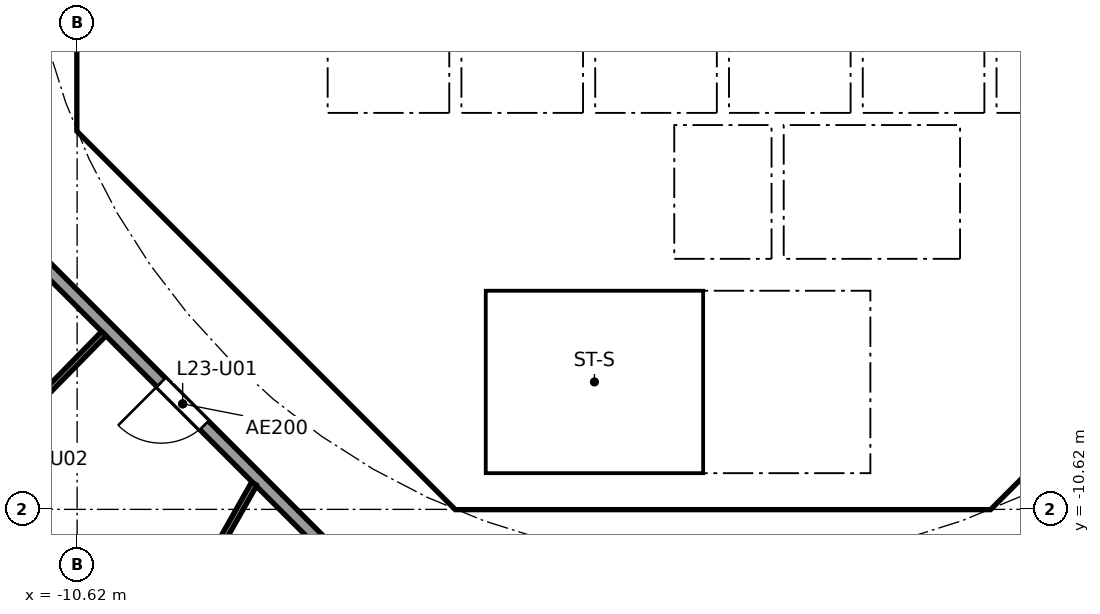
"""IFC4 building model, lengths in metres.
Left out: names, types, materials, properties, quantities, classifications, styles, units other than length and angle.
Written with IfcOpenShell. Run it as: python <this file> out.ifc"""

import sys

from ifc_helpers import new_model, si_unit, direction, frame, frame_2d, origin, place, context, subcontext, project, spatial, polyline, rectangle, outline, extrude, element, fill, save


model = new_model("IFC4")
c1 = context("Model", 3, precision=1e-05, world=origin(), true_north=direction((0.0, 1.0)))
c2 = subcontext(c1, "Body", "Model", "MODEL_VIEW")
j1 = project(units=[si_unit("LENGTHUNIT", "METRE"), si_unit("PLANEANGLEUNIT", "RADIAN")], contexts=[c1])
p1 = place(None, origin())
s1 = spatial("IfcSite", under=j1, at=p1, CompositionType="ELEMENT")
p2 = place(p1, origin())
s2 = spatial("IfcBuilding", under=s1, at=p2, CompositionType="ELEMENT")
p3 = place(p2, frame((0.0, 0.0, 95.5)))
s3 = spatial("IfcBuildingStorey", under=s2, at=p3, CompositionType="ELEMENT", Elevation=95.5)
p4 = place(p3, frame((-10.325, 3.801, 0.0), z_axis=(0.0, 0.0, 1.0), x_axis=(0.0, -1.0, 0.0)))
e1 = element("IfcWall", 1, at=p4, inside=s3, PredefinedType="SHEAR", context=c2, shape_type="SweptSolid", body=[
    extrude(rectangle(XDim=7.602, YDim=0.6, at=frame_2d((3.801, 0.0))), origin(), (0.0, 0.0, 1.0), 3.44),
])
p5 = place(p4, frame((0.651, 0.0, 0.0)))
e2 = element("IfcOpeningElement", 2, at=p5, cuts=e1, PredefinedType="OPENING", context=c2, shape_type="SweptSolid", body=[
    extrude(rectangle(XDim=1.5, YDim=2.1, at=frame_2d((0.75, 1.05))), frame((0.0, 0.31, 0.0), z_axis=(0.0, -1.0, 0.0), x_axis=(1.0, 0.0, 0.0)), (0.0, 0.0, 1.0), 0.62),
])
p6 = place(p4, frame((5.451, 0.0, 0.0)))
e3 = element("IfcOpeningElement", 3, at=p6, cuts=e1, PredefinedType="OPENING", context=c2, shape_type="SweptSolid", body=[
    extrude(rectangle(XDim=1.5, YDim=2.1, at=frame_2d((0.75, 1.05))), frame((0.0, 0.31, 0.0), z_axis=(0.0, -1.0, 0.0), x_axis=(1.0, 0.0, 0.0)), (0.0, 0.0, 1.0), 0.62),
])
p7 = place(p3, frame((-9.988, -4.613, 0.0), z_axis=(0.0, 0.0, 1.0), x_axis=(0.707106781187, -0.707106781187, 0.0)))
e4 = element("IfcWall", 4, at=p7, inside=s3, PredefinedType="SHEAR", context=c2, shape_type="SweptSolid", body=[
    extrude(rectangle(XDim=7.602, YDim=0.6, at=frame_2d((3.801, 0.0))), origin(), (0.0, 0.0, 1.0), 3.44),
])
p8 = place(p7, frame((6.151, 0.0, 0.0)))
e5 = element("IfcOpeningElement", 5, at=p8, cuts=e4, PredefinedType="OPENING", context=c2, shape_type="SweptSolid", body=[
    extrude(rectangle(XDim=1.1, YDim=2.1, at=frame_2d((0.55, 1.05))), frame((0.0, 0.31, 0.0), z_axis=(0.0, -1.0, 0.0), x_axis=(1.0, 0.0, 0.0)), (0.0, 0.0, 1.0), 0.62),
])
p9 = place(p3, frame((4.613, -9.988, 0.0), z_axis=(0.0, 0.0, 1.0), x_axis=(0.707106781187, 0.707106781187, 0.0)))
e6 = element("IfcWall", 6, at=p9, inside=s3, PredefinedType="SHEAR", context=c2, shape_type="SweptSolid", body=[
    extrude(rectangle(XDim=7.602, YDim=0.6, at=frame_2d((3.801, 0.0))), origin(), (0.0, 0.0, 1.0), 3.44),
])
p10 = place(p9, frame((3.201, 0.0, 0.0)))
e7 = element("IfcOpeningElement", 7, at=p10, cuts=e6, PredefinedType="OPENING", context=c2, shape_type="SweptSolid", body=[
    extrude(rectangle(XDim=1.2, YDim=2.1, at=frame_2d((0.6, 1.05))), frame((0.0, 0.31, 0.0), z_axis=(0.0, -1.0, 0.0), x_axis=(1.0, 0.0, 0.0)), (0.0, 0.0, 1.0), 0.62),
])
p11 = place(p3, frame((4.0, -10.025, 0.0), z_axis=(0.0, 0.0, 1.0), x_axis=(0.0, 1.0, 0.0)))
e8 = element("IfcWall", 8, at=p11, inside=s3, PredefinedType="SOLIDWALL", context=c2, shape_type="SweptSolid", body=[
    extrude(rectangle(XDim=3.0, YDim=0.2, at=frame_2d((1.5, 0.0))), origin(), (0.0, 0.0, 1.0), 3.44),
])
p12 = place(p11, frame((0.975, 0.0, 0.0)))
e9 = element("IfcOpeningElement", 9, at=p12, cuts=e8, PredefinedType="OPENING", context=c2, shape_type="SweptSolid", body=[
    extrude(rectangle(XDim=1.1, YDim=2.1, at=frame_2d((0.55, 1.05))), frame((0.0, 0.11, 0.0), z_axis=(0.0, -1.0, 0.0), x_axis=(1.0, 0.0, 0.0)), (0.0, 0.0, 1.0), 0.22),
])
p13 = place(p3, frame((-7.4, -6.627, 0.0), z_axis=(0.0, 0.0, 1.0), x_axis=(0.0, 1.0, 0.0)))
e10 = element("IfcWall", 10, at=p13, inside=s3, PredefinedType="PARTITIONING", context=c2, shape_type="SweptSolid", body=[
    extrude(rectangle(XDim=2.527, YDim=0.15, at=frame_2d((1.263, 0.0))), origin(), (0.0, 0.0, 1.0), 3.44),
])
p14 = place(p13, frame((0.776, 0.0, 0.0)))
e11 = element("IfcOpeningElement", 11, at=p14, cuts=e10, PredefinedType="OPENING", context=c2, shape_type="SweptSolid", body=[
    extrude(rectangle(XDim=0.9, YDim=2.1, at=frame_2d((0.45, 1.05))), frame((0.0, 0.085, 0.0), z_axis=(0.0, -1.0, 0.0), x_axis=(1.0, 0.0, 0.0)), (0.0, 0.0, 1.0), 0.17),
])
p15 = place(p3, frame((4.0, -6.5, 0.0), z_axis=(0.0, 0.0, 1.0), x_axis=(0.0, 1.0, 0.0)))
e12 = element("IfcWall", 12, at=p15, inside=s3, PredefinedType="SOLIDWALL", context=c2, shape_type="SweptSolid", body=[
    extrude(rectangle(XDim=2.2, YDim=0.2, at=frame_2d((1.1, 0.0))), origin(), (0.0, 0.0, 1.0), 3.44),
])
p16 = place(p15, frame((0.55, 0.0, 0.0)))
e13 = element("IfcOpeningElement", 13, at=p16, cuts=e12, PredefinedType="OPENING", context=c2, shape_type="SweptSolid", body=[
    extrude(rectangle(XDim=1.1, YDim=2.1, at=frame_2d((0.55, 1.05))), frame((0.0, 0.11, 0.0), z_axis=(0.0, -1.0, 0.0), x_axis=(1.0, 0.0, 0.0)), (0.0, 0.0, 1.0), 0.22),
])
p17 = place(p3, frame((-4.0, -6.5, 0.0), z_axis=(0.0, 0.0, 1.0), x_axis=(0.0, 1.0, 0.0)))
e14 = element("IfcWall", 14, at=p17, inside=s3, PredefinedType="SOLIDWALL", context=c2, shape_type="SweptSolid", body=[
    extrude(rectangle(XDim=2.2, YDim=0.2, at=frame_2d((1.1, 0.0))), origin(), (0.0, 0.0, 1.0), 3.44),
])
p18 = place(p17, frame((0.65, 0.0, 0.0)))
e15 = element("IfcOpeningElement", 15, at=p18, cuts=e14, PredefinedType="OPENING", context=c2, shape_type="SweptSolid", body=[
    extrude(rectangle(XDim=0.9, YDim=2.1, at=frame_2d((0.45, 1.05))), frame((0.0, 0.11, 0.0), z_axis=(0.0, -1.0, 0.0), x_axis=(1.0, 0.0, 0.0)), (0.0, 0.0, 1.0), 0.22),
])
p19 = place(p3, origin())
e16 = element("IfcWall", 16, at=p19, inside=s3, PredefinedType="SHEAR", context=c2, shape_type="SweptSolid", body=[
    extrude(outline(polyline([(-10.625, -3.801), (-10.025, -3.801), (-10.025, -4.152), (-9.776, -4.401), (-10.2, -4.825), (-10.625, -4.401), (-10.625, -3.801)])), origin(), (0.0, 0.0, 1.0), 3.44),
])
p20 = place(p3, origin())
e17 = element("IfcWall", 17, at=p20, inside=s3, PredefinedType="SHEAR", context=c2, shape_type="SweptSolid", body=[
    extrude(outline(polyline([(-4.152, -10.025), (4.152, -10.025), (4.401, -9.776), (4.825, -10.2), (4.401, -10.625), (-4.401, -10.625), (-4.825, -10.2), (-4.401, -9.776), (-4.152, -10.025)])), origin(), (0.0, 0.0, 1.0), 3.44),
])
for number, where, z_axis, x_axis in (
    (18, (-0.9, -6.5, 0.0), (0.0, 0.0, 1.0), (0.0, 1.0, 0.0)),
    (19, (0.9, -6.5, 0.0), (0.0, 0.0, 1.0), (0.0, 1.0, 0.0)),
):
    element("IfcWall", number, at=place(p3, frame(where, z_axis=z_axis, x_axis=x_axis)), inside=s3, PredefinedType="SOLIDWALL", context=c2, shape_type="SweptSolid", body=[
        extrude(rectangle(XDim=2.2, YDim=0.2, at=frame_2d((1.1, 0.0))), origin(), (0.0, 0.0, 1.0), 3.44),
    ])
p21 = place(p3, origin())
e20 = element("IfcWall", 20, at=p21, inside=s3, PredefinedType="SOLIDWALL", context=c2, shape_type="SweptSolid", body=[
    extrude(outline(polyline([(-6.7, -2.1), (-6.5, -2.1), (-6.5, -4.1), (-4.5, -4.1), (-4.5, -2.1), (-4.3, -2.1), (-4.3, -4.1), (-2.3, -4.1), (-2.3, -2.1), (-2.1, -2.1), (-2.1, -4.1), (-0.1, -4.1), (-0.1, -2.1), (0.1, -2.1), (0.1, -4.1), (2.1, -4.1), (2.1, -2.1), (2.3, -2.1), (2.3, -4.1), (4.3, -4.1), (4.3, -2.1), (4.5, -2.1), (4.5, -4.1), (6.5, -4.1), (6.5, -2.1), (6.7, -2.1), (6.7, -4.3), (-6.7, -4.3), (-6.7, -2.1)])), origin(), (0.0, 0.0, 1.0), 3.44),
])
p22 = place(p3, frame((-10.025, -4.0, 0.0), z_axis=(0.0, 0.0, 1.0), x_axis=(1.0, 0.0, 0.0)))
e21 = element("IfcWall", 21, at=p22, inside=s3, PredefinedType="PARTITIONING", context=c2, shape_type="SweptSolid", body=[
    extrude(rectangle(XDim=3.325, YDim=0.2, at=frame_2d((1.662, 0.0))), origin(), (0.0, 0.0, 1.0), 3.44),
])
p23 = place(p3, origin())
e22 = element("IfcWall", 22, at=p23, inside=s3, PredefinedType="SOLIDWALL", context=c2, shape_type="SweptSolid", body=[
    extrude(outline(polyline([(-3.9, -10.025), (-4.1, -10.025), (-4.1, -7.025), (-3.9, -7.025), (-3.9, -10.025)])), origin(), (0.0, 0.0, 1.0), 3.44),
])
p24 = place(p3, origin())
e23 = element("IfcWall", 23, at=p24, inside=s3, PredefinedType="SOLIDWALL", context=c2, shape_type="SweptSolid", body=[
    extrude(outline(polyline([(4.1, -7.025), (-4.1, -7.025), (-4.1, -6.5), (4.1, -6.5), (4.1, -7.025)])), origin(), (0.0, 0.0, 1.0), 3.44),
])
p25 = place(p3, frame((-12.635, -5.134, 0.0), z_axis=(0.0, 0.0, 1.0), x_axis=(0.707106781187, -0.707106781187, 0.0)))
e24 = element("IfcWall", 24, at=p25, inside=s3, PredefinedType="PARTITIONING", context=c2, shape_type="SweptSolid", body=[
    extrude(rectangle(XDim=10.609, YDim=0.2, at=frame_2d((5.305, 0.0))), origin(), (0.0, 0.0, 1.0), 3.44),
])
p26 = place(p25, frame((4.804, 0.0, 0.0)))
e25 = element("IfcOpeningElement", 25, at=p26, cuts=e24, PredefinedType="OPENING", context=c2, shape_type="SweptSolid", body=[
    extrude(rectangle(XDim=1.0, YDim=2.1, at=frame_2d((0.5, 1.05))), frame((0.0, 0.11, 0.0), z_axis=(0.0, -1.0, 0.0), x_axis=(1.0, 0.0, 0.0)), (0.0, 0.0, 1.0), 0.22),
])
p27 = place(p3, frame((-10.181, -7.729, 0.0), z_axis=(0.0, 0.0, 1.0), x_axis=(-0.699710752188, -0.714426247609, 0.0)))
e26 = element("IfcWall", 26, at=p27, inside=s3, PredefinedType="PARTITIONING", context=c2, shape_type="SweptSolid", body=[
    extrude(rectangle(XDim=9.938, YDim=0.1, at=frame_2d((4.969, 0.0))), origin(), (0.0, 0.0, 1.0), 2.687),
])
p28 = place(p27, frame((1.675, 0.0, 0.0)))
e27 = element("IfcOpeningElement", 27, at=p28, cuts=e26, PredefinedType="OPENING", context=c2, shape_type="SweptSolid", body=[
    extrude(rectangle(XDim=0.9, YDim=2.1, at=frame_2d((0.45, 1.05))), frame((0.0, 0.06, 0.0), z_axis=(0.0, -1.0, 0.0), x_axis=(1.0, 0.0, 0.0)), (0.0, 0.0, 1.0), 0.12),
])
p29 = place(p27, frame((6.619, 0.0, 0.0)))
e28 = element("IfcOpeningElement", 28, at=p29, cuts=e26, PredefinedType="OPENING", context=c2, shape_type="SweptSolid", body=[
    extrude(rectangle(XDim=0.9, YDim=2.1, at=frame_2d((0.45, 1.05))), frame((0.0, 0.06, 0.0), z_axis=(0.0, -1.0, 0.0), x_axis=(1.0, 0.0, 0.0)), (0.0, 0.0, 1.0), 0.12),
])
p30 = place(p3, frame((-7.707, -10.198, 0.0), z_axis=(0.0, 0.0, 1.0), x_axis=(-0.49395524734, -0.869487328042, 0.0)))
e29 = element("IfcWall", 29, at=p30, inside=s3, PredefinedType="PARTITIONING", context=c2, shape_type="SweptSolid", body=[
    extrude(rectangle(XDim=15.025, YDim=0.1, at=frame_2d((7.512, 0.0))), origin(), (0.0, 0.0, 1.0), 2.687),
])
p31 = place(p30, frame((1.684, 0.0, 0.0)))
e30 = element("IfcOpeningElement", 30, at=p31, cuts=e29, PredefinedType="OPENING", context=c2, shape_type="SweptSolid", body=[
    extrude(rectangle(XDim=0.9, YDim=2.1, at=frame_2d((0.45, 1.05))), frame((0.0, 0.06, 0.0), z_axis=(0.0, -1.0, 0.0), x_axis=(1.0, 0.0, 0.0)), (0.0, 0.0, 1.0), 0.12),
])
p32 = place(p30, frame((6.648, 0.0, 0.0)))
e31 = element("IfcOpeningElement", 31, at=p32, cuts=e29, PredefinedType="OPENING", context=c2, shape_type="SweptSolid", body=[
    extrude(rectangle(XDim=0.9, YDim=2.1, at=frame_2d((0.45, 1.05))), frame((0.0, 0.06, 0.0), z_axis=(0.0, -1.0, 0.0), x_axis=(1.0, 0.0, 0.0)), (0.0, 0.0, 1.0), 0.12),
])
p33 = place(p30, frame((12.027, 0.0, 0.0)))
e32 = element("IfcOpeningElement", 32, at=p33, cuts=e29, PredefinedType="OPENING", context=c2, shape_type="SweptSolid", body=[
    extrude(rectangle(XDim=0.9, YDim=2.1, at=frame_2d((0.45, 1.05))), frame((0.0, 0.06, 0.0), z_axis=(0.0, -1.0, 0.0), x_axis=(1.0, 0.0, 0.0)), (0.0, 0.0, 1.0), 0.12),
])
p34 = place(p16, origin())
e33 = element("IfcDoor", 33, at=p34, inside=s3, OperationType="DOUBLE_DOOR_SLIDING", PredefinedType="DOOR", context=c2, shape_type="SweptSolid", body=[
    extrude(rectangle(XDim=1.1, YDim=2.1, at=frame_2d((0.55, 1.05))), frame((0.0, 0.025, 0.0), z_axis=(0.0, -1.0, 0.0), x_axis=(1.0, 0.0, 0.0)), (0.0, 0.0, 1.0), 0.05),
])
fill(e13, e33)
p35 = place(p12, origin())
e34 = element("IfcDoor", 34, at=p35, inside=s3, OperationType="SINGLE_SWING_LEFT", PredefinedType="DOOR", context=c2, shape_type="SweptSolid", body=[
    extrude(rectangle(XDim=1.1, YDim=2.1, at=frame_2d((0.55, 1.05))), frame((0.0, 0.025, 0.0), z_axis=(0.0, -1.0, 0.0), x_axis=(1.0, 0.0, 0.0)), (0.0, 0.0, 1.0), 0.05),
])
fill(e9, e34)
p36 = place(p14, origin())
e35 = element("IfcDoor", 35, at=p36, inside=s3, OperationType="SINGLE_SWING_LEFT", PredefinedType="DOOR", context=c2, shape_type="SweptSolid", body=[
    extrude(rectangle(XDim=0.9, YDim=2.1, at=frame_2d((0.45, 1.05))), frame((0.0, 0.025, 0.0), z_axis=(0.0, -1.0, 0.0), x_axis=(1.0, 0.0, 0.0)), (0.0, 0.0, 1.0), 0.05),
])
fill(e11, e35)
p37 = place(p18, frame((0.9, 0.0, 0.0), x_axis=(-1.0, 0.0, 0.0)))
e36 = element("IfcDoor", 36, at=p37, inside=s3, OperationType="SINGLE_SWING_RIGHT", PredefinedType="DOOR", context=c2, shape_type="SweptSolid", body=[
    extrude(rectangle(XDim=0.9, YDim=2.1, at=frame_2d((0.45, 1.05))), frame((0.0, 0.025, 0.0), z_axis=(0.0, -1.0, 0.0), x_axis=(1.0, 0.0, 0.0)), (0.0, 0.0, 1.0), 0.05),
])
fill(e15, e36)
p38 = place(p6, origin())
e37 = element("IfcDoor", 37, at=p38, inside=s3, OperationType="DOUBLE_DOOR_SINGLE_SWING", PredefinedType="DOOR", context=c2, shape_type="SweptSolid", body=[
    extrude(rectangle(XDim=1.5, YDim=2.1, at=frame_2d((0.75, 1.05))), frame((0.0, 0.025, 0.0), z_axis=(0.0, -1.0, 0.0), x_axis=(1.0, 0.0, 0.0)), (0.0, 0.0, 1.0), 0.05),
])
fill(e3, e37)
p39 = place(p8, origin())
e38 = element("IfcDoor", 38, at=p39, inside=s3, OperationType="SINGLE_SWING_RIGHT", PredefinedType="DOOR", context=c2, shape_type="SweptSolid", body=[
    extrude(rectangle(XDim=1.1, YDim=2.1, at=frame_2d((0.55, 1.05))), frame((0.0, 0.025, 0.0), z_axis=(0.0, -1.0, 0.0), x_axis=(1.0, 0.0, 0.0)), (0.0, 0.0, 1.0), 0.05),
])
fill(e5, e38)
p40 = place(p26, frame((1.0, 0.0, 0.0), x_axis=(-1.0, 0.0, 0.0)))
e39 = element("IfcDoor", 39, at=p40, inside=s3, OperationType="SINGLE_SWING_RIGHT", PredefinedType="DOOR", context=c2, shape_type="SweptSolid", body=[
    extrude(rectangle(XDim=1.0, YDim=2.1, at=frame_2d((0.5, 1.05))), frame((0.0, 0.025, 0.0), z_axis=(0.0, -1.0, 0.0), x_axis=(1.0, 0.0, 0.0)), (0.0, 0.0, 1.0), 0.05),
])
fill(e25, e39)
save(model, sys.argv[1])
